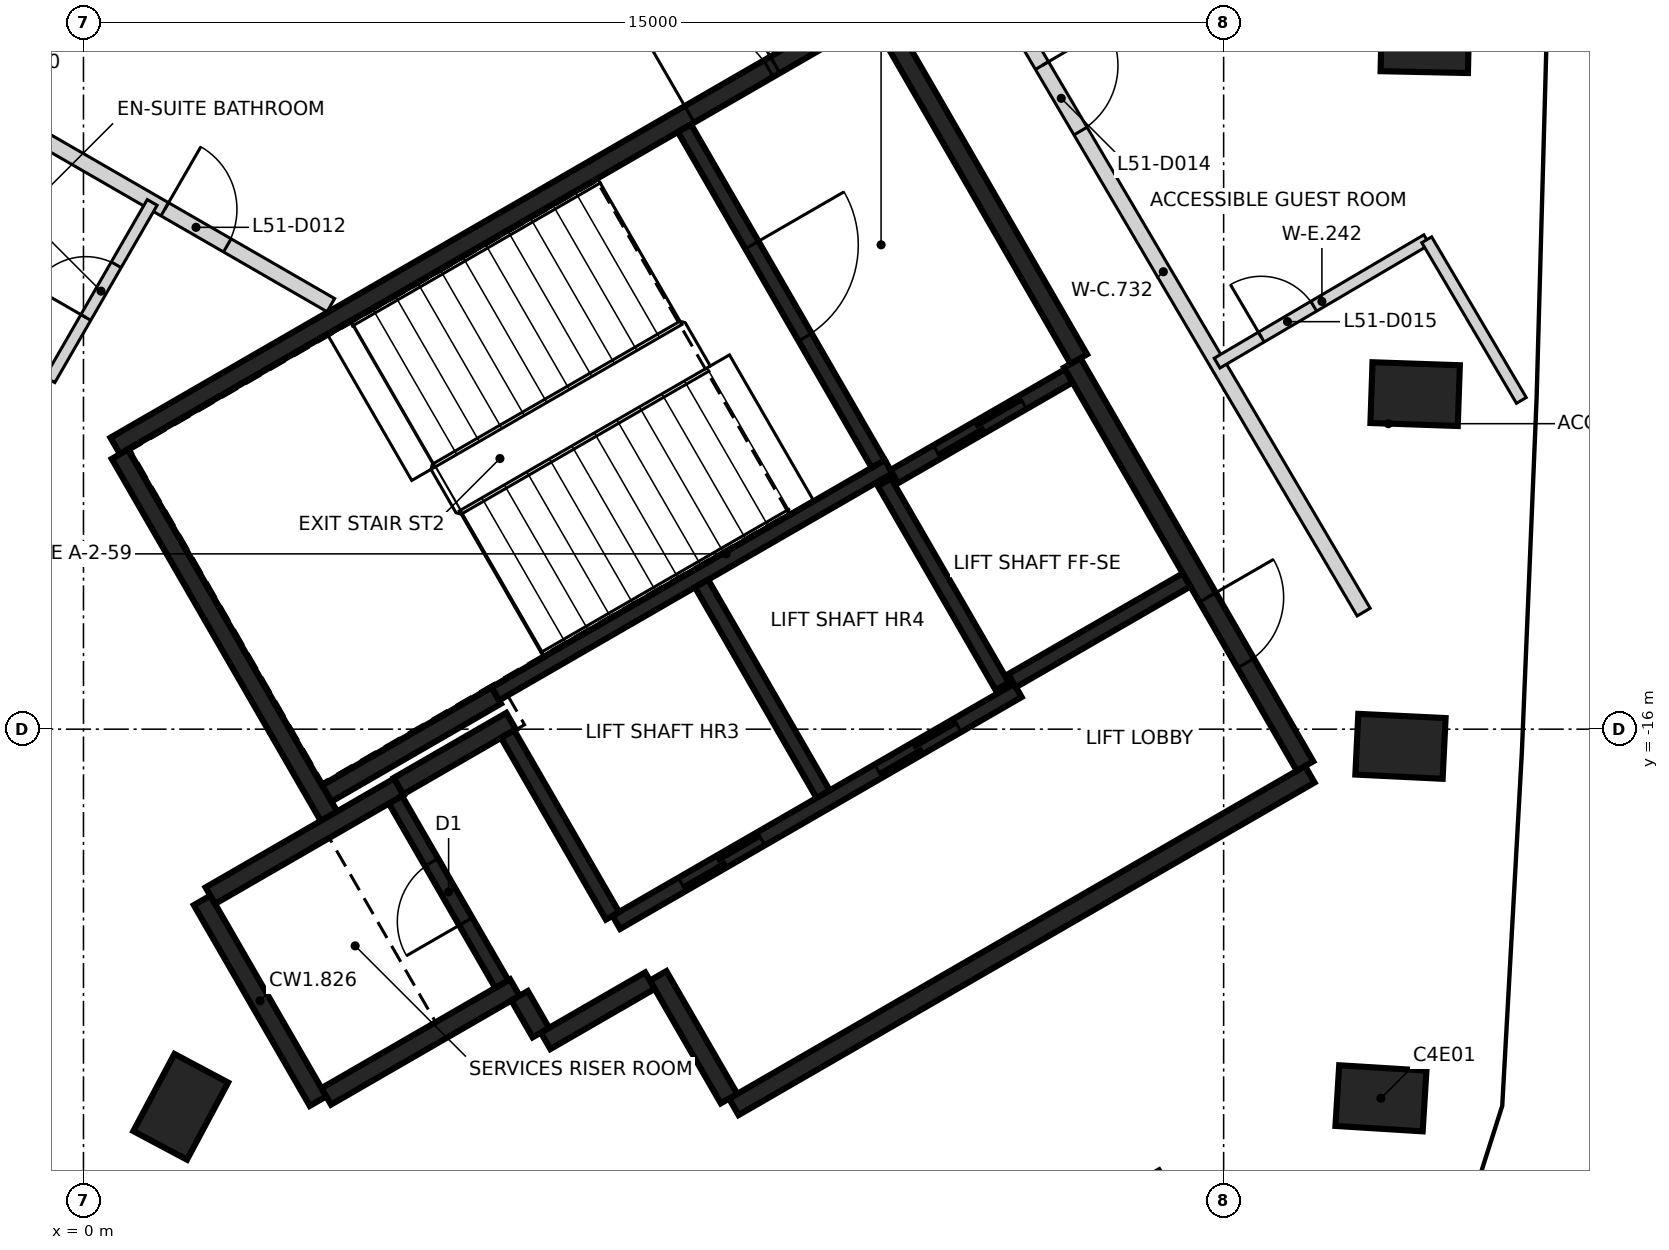
"""IFC4 building model, lengths in metres.
Left out: names, types, materials, properties, quantities, classifications, styles, units other than length and angle.
Written with IfcOpenShell. Run it as: python <this file> out.ifc"""

import sys

from ifc_helpers import new_model, si_unit, direction, frame, frame_2d, origin, origin_2d, place, context, subcontext, project, spatial, rectangle, extrude, element, fill, save


model = new_model("IFC4")
c1 = context("Model", 3, precision=1e-05, world=origin(), true_north=direction((0.0, 1.0)))
c2 = subcontext(c1, "Body", "Model", "MODEL_VIEW")
j1 = project(units=[si_unit("LENGTHUNIT", "METRE"), si_unit("PLANEANGLEUNIT", "RADIAN")], contexts=[c1])
p1 = place(None, origin())
s1 = spatial("IfcSite", under=j1, at=p1, CompositionType="ELEMENT")
p2 = place(p1, origin())
s2 = spatial("IfcBuilding", under=s1, at=p2, CompositionType="ELEMENT")
p3 = place(p2, frame((0.0, 0.0, 204.4)))
s3 = spatial("IfcBuildingStorey", under=s2, at=p3, CompositionType="ELEMENT", Elevation=204.4)
for number, where, z_axis, x_axis in (
    (1, (17.07, -20.856, -0.35), (0.0, 0.0, 1.0), (-0.998, 0.062, 0.0)),
    (2, (17.326, -16.226, -0.35), (0.0, 0.0, 1.0), (-0.999, 0.048, 0.0)),
    (3, (17.519, -11.592, -0.35), (0.0, 0.0, 1.0), (-0.999, 0.034, 0.0)),
    (4, (17.648, -6.956, -0.35), (0.0, 0.0, 1.0), (-1.0, 0.021, 0.0)),
    (5, (1.279, -20.968, -0.35), (0.0, 0.0, 1.0), (0.47, 0.883, 0.0)),
):
    element("IfcColumn", number, at=place(p3, frame(where, z_axis=z_axis, x_axis=x_axis)), inside=s3, PredefinedType="COLUMN", context=c2, shape_type="SweptSolid", body=[
        extrude(rectangle(XDim=1.15, YDim=0.8, at=origin_2d()), origin(), (0.0, 0.0, 1.0), 3.6),
    ])
p4 = place(p3, frame((0.417, -12.273, 0.0), z_axis=(0.0, 0.0, 1.0), x_axis=(0.866021906294, 0.500006057782, 0.0)))
e6 = element("IfcWall", 6, at=p4, inside=s3, PredefinedType="SHEAR", context=c2, shape_type="SweptSolid", body=[
    extrude(rectangle(XDim=11.55, YDim=0.25, at=frame_2d((5.775, 0.0))), origin(), (0.0, 0.0, 1.0), 3.25),
])
p5 = place(p4, frame((10.025, 0.0, 0.0)))
e7 = element("IfcOpeningElement", 7, at=p5, cuts=e6, PredefinedType="OPENING", context=c2, shape_type="SweptSolid", body=[
    extrude(rectangle(XDim=1.2, YDim=2.1, at=frame_2d((0.6, 1.05))), frame((0.0, 0.135, 0.0), z_axis=(0.0, -1.0, 0.0), x_axis=(1.0, 0.0, 0.0)), (0.0, 0.0, 1.0), 0.27),
])
p6 = place(p4, frame((8.725, 0.0, 0.0)))
e8 = element("IfcOpeningElement", 8, at=p6, cuts=e6, PredefinedType="OPENING", context=c2, shape_type="SweptSolid", body=[
    extrude(rectangle(XDim=1.2, YDim=2.1, at=frame_2d((0.6, 1.05))), frame((0.0, 0.135, 0.0), z_axis=(0.0, -1.0, 0.0), x_axis=(1.0, 0.0, 0.0)), (0.0, 0.0, 1.0), 0.27),
])
p7 = place(p3, frame((16.133, -16.594, 0.0), z_axis=(0.0, 0.0, 1.0), x_axis=(-0.866022959057, -0.500004234368, 0.0)))
e9 = element("IfcWall", 9, at=p7, inside=s3, PredefinedType="SHEAR", context=c2, shape_type="SweptSolid", body=[
    extrude(rectangle(XDim=8.75, YDim=0.25, at=frame_2d((4.375, 0.0))), origin(), (0.0, 0.0, 1.0), 3.25),
])
p8 = place(p3, frame((13.008, -11.181, 0.0), z_axis=(0.0, 0.0, 1.0), x_axis=(0.500001955336, -0.866024274868, 0.0)))
e10 = element("IfcWall", 10, at=p8, inside=s3, PredefinedType="SHEAR", context=c2, shape_type="SweptSolid", body=[
    extrude(rectangle(XDim=6.125, YDim=0.25, at=frame_2d((3.062, 0.0))), origin(), (0.0, 0.0, 1.0), 3.25),
])
p9 = place(p8, frame((3.563, 0.0, 0.0)))
e11 = element("IfcOpeningElement", 11, at=p9, cuts=e10, PredefinedType="OPENING", context=c2, shape_type="SweptSolid", body=[
    extrude(rectangle(XDim=1.0, YDim=2.1, at=frame_2d((0.5, 1.05))), frame((0.0, 0.135, 0.0), z_axis=(0.0, -1.0, 0.0), x_axis=(1.0, 0.0, 0.0)), (0.0, 0.0, 1.0), 0.27),
])
p10 = place(p3, frame((3.235, -17.153, 0.0), z_axis=(0.0, 0.0, 1.0), x_axis=(-0.500008851346, 0.866020293397, 0.0)))
e12 = element("IfcWall", 12, at=p10, inside=s3, PredefinedType="SHEAR", context=c2, shape_type="SweptSolid", body=[
    extrude(rectangle(XDim=5.51, YDim=0.25, at=frame_2d((2.755, 0.0))), origin(), (0.0, 0.0, 1.0), 3.25),
])
p11 = place(p3, frame((10.483, -6.606, 0.0), z_axis=(0.0, 0.0, 1.0), x_axis=(0.49999885962, -0.866026062182, 0.0)))
e13 = element("IfcWall", 13, at=p11, inside=s3, PredefinedType="SHEAR", context=c2, shape_type="SweptSolid", body=[
    extrude(rectangle(XDim=5.225, YDim=0.25, at=frame_2d((2.612, 0.0))), origin(), (0.0, 0.0, 1.0), 3.25),
])
p12 = place(p3, frame((3.085, -20.894, 0.0), z_axis=(0.0, 0.0, 1.0), x_axis=(-0.499978833458, 0.866037623948, 0.0)))
e14 = element("IfcWall", 14, at=p12, inside=s3, PredefinedType="SHEAR", context=c2, shape_type="SweptSolid", body=[
    extrude(rectangle(XDim=3.05, YDim=0.25, at=frame_2d((1.525, 0.0))), origin(), (0.0, 0.0, 1.0), 3.25),
])
p13 = place(p3, frame((1.669, -18.19, 0.0), z_axis=(0.0, 0.0, 1.0), x_axis=(0.866042235819, 0.499970844928, 0.0)))
e15 = element("IfcWall", 15, at=p13, inside=s3, PredefinedType="SHEAR", context=c2, shape_type="SweptSolid", body=[
    extrude(rectangle(XDim=2.865, YDim=0.25, at=frame_2d((1.432, 0.0))), origin(), (0.0, 0.0, 1.0), 3.25),
])
p14 = place(p3, frame((5.675, -19.399, 0.0), z_axis=(0.0, 0.0, 1.0), x_axis=(-0.866026637627, -0.499997862916, 0.0)))
e16 = element("IfcWall", 16, at=p14, inside=s3, PredefinedType="SHEAR", context=c2, shape_type="SweptSolid", body=[
    extrude(rectangle(XDim=2.865, YDim=0.25, at=frame_2d((1.432, 0.0))), origin(), (0.0, 0.0, 1.0), 3.25),
])
p15 = place(p3, frame((5.431, -15.556, 0.0), z_axis=(0.0, 0.0, 1.0), x_axis=(-0.866022940537, -0.500004266446, 0.0)))
e17 = element("IfcWall", 17, at=p15, inside=s3, PredefinedType="SHEAR", context=c2, shape_type="SweptSolid", body=[
    extrude(rectangle(XDim=2.575, YDim=0.25, at=frame_2d((1.287, 0.0))), origin(), (0.0, 0.0, 1.0), 3.25),
])
p16 = place(p3, frame((8.493, -20.86, 0.0), z_axis=(0.0, 0.0, 1.0), x_axis=(-0.500039802285, 0.866002422705, 0.0)))
e18 = element("IfcWall", 18, at=p16, inside=s3, PredefinedType="SHEAR", context=c2, shape_type="SweptSolid", body=[
    extrude(rectangle(XDim=1.865, YDim=0.25, at=frame_2d((0.932, 0.0))), origin(), (0.0, 0.0, 1.0), 3.25),
])
p17 = place(p3, frame((4.145, -16.749, 0.0), z_axis=(0.0, 0.0, 1.0), x_axis=(0.866038183914, 0.499977863513, 0.0)))
e19 = element("IfcWall", 19, at=p17, inside=s3, PredefinedType="SHEAR", context=c2, shape_type="SweptSolid", body=[
    extrude(rectangle(XDim=1.71, YDim=0.25, at=frame_2d((0.855, 0.0))), origin(), (0.0, 0.0, 1.0), 3.25),
])
p18 = place(p3, frame((7.452, -19.308, 0.0), z_axis=(0.0, 0.0, 1.0), x_axis=(-0.866044474677, -0.49996696679, 0.0)))
e20 = element("IfcWall", 20, at=p18, inside=s3, PredefinedType="SHEAR", context=c2, shape_type="SweptSolid", body=[
    extrude(rectangle(XDim=1.584, YDim=0.25, at=frame_2d((0.792, 0.0))), origin(), (0.0, 0.0, 1.0), 3.25),
])
p19 = place(p3, frame((6.017, -19.992, 0.0), z_axis=(0.0, 0.0, 1.0), x_axis=(-0.500364886717, 0.865814633822, 0.0)))
e21 = element("IfcWall", 21, at=p19, inside=s3, PredefinedType="SHEAR", context=c2, shape_type="SweptSolid", body=[
    extrude(rectangle(XDim=0.559, YDim=0.25, at=frame_2d((0.28, 0.0))), origin(), (0.0, 0.0, 1.0), 3.25),
])
p20 = place(p3, frame((5.419, -15.534, 0.0), z_axis=(0.0, 0.0, 1.0), x_axis=(0.866029065029, 0.499993658486, 0.0)))
e22 = element("IfcWall", 22, at=p20, inside=s3, PredefinedType="SHEAR", context=c2, shape_type="SweptSolid", body=[
    extrude(rectangle(XDim=5.974, YDim=0.2, at=frame_2d((2.987, 0.0))), origin(), (0.0, 0.0, 1.0), 3.25),
])
p21 = place(p3, frame((7.01, -18.542, 0.0), z_axis=(0.0, 0.0, 1.0), x_axis=(0.866030299012, 0.499991521122, 0.0)))
e23 = element("IfcWall", 23, at=p21, inside=s3, PredefinedType="SHEAR", context=c2, shape_type="SweptSolid", body=[
    extrude(rectangle(XDim=6.1, YDim=0.2, at=frame_2d((3.05, 0.0))), origin(), (0.0, 0.0, 1.0), 3.25),
])
p22 = place(p21, frame((1.0, 0.0, 0.0)))
e24 = element("IfcOpeningElement", 24, at=p22, cuts=e23, PredefinedType="OPENING", context=c2, shape_type="SweptSolid", body=[
    extrude(rectangle(XDim=1.2, YDim=2.1, at=frame_2d((0.6, 1.05))), frame((0.0, 0.11, 0.0), z_axis=(0.0, -1.0, 0.0), x_axis=(1.0, 0.0, 0.0)), (0.0, 0.0, 1.0), 0.22),
])
p23 = place(p21, frame((3.982, 0.0, 0.0)))
e25 = element("IfcOpeningElement", 25, at=p23, cuts=e23, PredefinedType="OPENING", context=c2, shape_type="SweptSolid", body=[
    extrude(rectangle(XDim=1.2, YDim=2.1, at=frame_2d((0.6, 1.05))), frame((0.0, 0.11, 0.0), z_axis=(0.0, -1.0, 0.0), x_axis=(1.0, 0.0, 0.0)), (0.0, 0.0, 1.0), 0.22),
])
p24 = place(p3, frame((7.906, -8.094, 0.0), z_axis=(0.0, 0.0, 1.0), x_axis=(0.500027839223, -0.866009330205, 0.0)))
e26 = element("IfcWall", 26, at=p24, inside=s3, PredefinedType="SHEAR", context=c2, shape_type="SweptSolid", body=[
    extrude(rectangle(XDim=5.098, YDim=0.2, at=frame_2d((2.549, 0.0))), origin(), (0.0, 0.0, 1.0), 3.25),
])
p25 = place(p24, frame((1.774, 0.0, 0.0)))
e27 = element("IfcOpeningElement", 27, at=p25, cuts=e26, PredefinedType="OPENING", context=c2, shape_type="SweptSolid", body=[
    extrude(rectangle(XDim=1.4, YDim=2.1, at=frame_2d((0.7, 1.05))), frame((0.0, 0.11, 0.0), z_axis=(0.0, -1.0, 0.0), x_axis=(1.0, 0.0, 0.0)), (0.0, 0.0, 1.0), 0.22),
])
p26 = place(p3, frame((8.132, -14.084, 0.0), z_axis=(0.0, 0.0, 1.0), x_axis=(0.499997778408, -0.866026686418, 0.0)))
e28 = element("IfcWall", 28, at=p26, inside=s3, PredefinedType="SHEAR", context=c2, shape_type="SweptSolid", body=[
    extrude(rectangle(XDim=3.198, YDim=0.2, at=frame_2d((1.599, 0.0))), origin(), (0.0, 0.0, 1.0), 3.25),
])
p27 = place(p3, frame((5.503, -19.352, 0.0), z_axis=(0.0, 0.0, 1.0), x_axis=(-0.499986818241, 0.866033014143, 0.0)))
e29 = element("IfcWall", 29, at=p27, inside=s3, PredefinedType="SHEAR", context=c2, shape_type="SweptSolid", body=[
    extrude(rectangle(XDim=2.798, YDim=0.2, at=frame_2d((1.399, 0.0))), origin(), (0.0, 0.0, 1.0), 3.25),
])
p28 = place(p27, frame((0.949, 0.0, 0.0)))
e30 = element("IfcOpeningElement", 30, at=p28, cuts=e29, PredefinedType="OPENING", context=c2, shape_type="SweptSolid", body=[
    extrude(rectangle(XDim=0.9, YDim=2.1, at=frame_2d((0.45, 1.05))), frame((0.0, 0.11, 0.0), z_axis=(0.0, -1.0, 0.0), x_axis=(1.0, 0.0, 0.0)), (0.0, 0.0, 1.0), 0.22),
])
p29 = place(p3, frame((6.96, -18.455, 0.0), z_axis=(0.0, 0.0, 1.0), x_axis=(-0.499926705758, 0.866067716099, 0.0)))
e31 = element("IfcWall", 31, at=p29, inside=s3, PredefinedType="SHEAR", context=c2, shape_type="SweptSolid", body=[
    extrude(rectangle(XDim=2.759, YDim=0.2, at=frame_2d((1.38, 0.0))), origin(), (0.0, 0.0, 1.0), 3.25),
])
p30 = place(p3, frame((12.088, -15.437, 0.0), z_axis=(0.0, 0.0, 1.0), x_axis=(-0.500026960575, 0.86600983753, 0.0)))
e32 = element("IfcWall", 32, at=p30, inside=s3, PredefinedType="SHEAR", context=c2, shape_type="SweptSolid", body=[
    extrude(rectangle(XDim=3.1, YDim=0.2, at=frame_2d((1.55, 0.0))), origin(), (0.0, 0.0, 1.0), 3.25),
])
p31 = place(p3, frame((10.666, -12.678, 0.0), z_axis=(0.0, 0.0, 1.0), x_axis=(0.866018407898, 0.500012117035, 0.0)))
e33 = element("IfcWall", 33, at=p31, inside=s3, PredefinedType="SHEAR", context=c2, shape_type="SweptSolid", body=[
    extrude(rectangle(XDim=2.651, YDim=0.2, at=frame_2d((1.325, 0.0))), origin(), (0.0, 0.0, 1.0), 3.25),
])
p32 = place(p31, frame((0.652, 0.0, 0.0)))
e34 = element("IfcOpeningElement", 34, at=p32, cuts=e33, PredefinedType="OPENING", context=c2, shape_type="SweptSolid", body=[
    extrude(rectangle(XDim=1.3, YDim=2.1, at=frame_2d((0.65, 1.05))), frame((0.0, 0.11, 0.0), z_axis=(0.0, -1.0, 0.0), x_axis=(1.0, 0.0, 0.0)), (0.0, 0.0, 1.0), 0.22),
])
p33 = place(p3, frame((14.512, -14.037, 0.0), z_axis=(0.0, 0.0, 1.0), x_axis=(-0.866018407898, -0.500012117035, 0.0)))
e35 = element("IfcWall", 35, at=p33, inside=s3, PredefinedType="SHEAR", context=c2, shape_type="SweptSolid", body=[
    extrude(rectangle(XDim=2.651, YDim=0.2, at=frame_2d((1.325, 0.0))), origin(), (0.0, 0.0, 1.0), 3.25),
])
p34 = place(p3, frame((-8.001, -3.926, 0.0), z_axis=(0.0, 0.0, 1.0), x_axis=(0.866131158271, -0.499816783104, 0.0)))
e36 = element("IfcWall", 36, at=p34, inside=s3, PredefinedType="PARTITIONING", context=c2, shape_type="SweptSolid", body=[
    extrude(rectangle(XDim=12.995, YDim=0.2, at=frame_2d((6.498, 0.0))), origin(), (0.0, 0.0, 1.0), 3.25),
])
p35 = place(p34, frame((6.146, 0.0, 0.0)))
e37 = element("IfcOpeningElement", 37, at=p35, cuts=e36, PredefinedType="OPENING", context=c2, shape_type="SweptSolid", body=[
    extrude(rectangle(XDim=0.95, YDim=2.1, at=frame_2d((0.475, 1.05))), frame((0.0, 0.11, 0.0), z_axis=(0.0, -1.0, 0.0), x_axis=(1.0, 0.0, 0.0)), (0.0, 0.0, 1.0), 0.22),
])
p36 = place(p34, frame((10.472, 0.0, 0.0)))
e38 = element("IfcOpeningElement", 38, at=p36, cuts=e36, PredefinedType="OPENING", context=c2, shape_type="SweptSolid", body=[
    extrude(rectangle(XDim=0.95, YDim=2.1, at=frame_2d((0.475, 1.05))), frame((0.0, 0.11, 0.0), z_axis=(0.0, -1.0, 0.0), x_axis=(1.0, 0.0, 0.0)), (0.0, 0.0, 1.0), 0.22),
])
p37 = place(p3, frame((11.571, -5.505, 0.0), z_axis=(0.0, 0.0, 1.0), x_axis=(0.507266536157, -0.861789220921, 0.0)))
e39 = element("IfcWall", 39, at=p37, inside=s3, PredefinedType="PARTITIONING", context=c2, shape_type="SweptSolid", body=[
    extrude(rectangle(XDim=10.391, YDim=0.2, at=frame_2d((5.195, 0.0))), origin(), (0.0, 0.0, 1.0), 3.25),
])
p38 = place(p37, frame((2.048, 0.0, 0.0)))
e40 = element("IfcOpeningElement", 40, at=p38, cuts=e39, PredefinedType="OPENING", context=c2, shape_type="SweptSolid", body=[
    extrude(rectangle(XDim=1.0, YDim=2.1, at=frame_2d((0.5, 1.05))), frame((0.0, 0.11, 0.0), z_axis=(0.0, -1.0, 0.0), x_axis=(1.0, 0.0, 0.0)), (0.0, 0.0, 1.0), 0.22),
])
p39 = place(p3, frame((-3.042, -9.906, 0.0), z_axis=(0.0, 0.0, 1.0), x_axis=(0.866009279501, -0.500027927039, 0.0)))
e41 = element("IfcWall", 41, at=p39, inside=s3, PredefinedType="PARTITIONING", context=c2, shape_type="SweptSolid", body=[
    extrude(rectangle(XDim=2.998, YDim=0.15, at=frame_2d((1.499, 0.0))), origin(), (0.0, 0.0, 1.0), 3.25),
])
p40 = place(p3, frame((-0.442, -11.403, 0.0), z_axis=(0.0, 0.0, 1.0), x_axis=(0.499717222117, 0.866188604127, 0.0)))
e42 = element("IfcWall", 42, at=p40, inside=s3, PredefinedType="PARTITIONING", context=c2, shape_type="SweptSolid", body=[
    extrude(rectangle(XDim=2.693, YDim=0.15, at=frame_2d((1.347, 0.0))), origin(), (0.0, 0.0, 1.0), 3.25),
])
p41 = place(p40, frame((0.946, 0.0, 0.0)))
e43 = element("IfcOpeningElement", 43, at=p41, cuts=e42, PredefinedType="OPENING", context=c2, shape_type="SweptSolid", body=[
    extrude(rectangle(XDim=0.8, YDim=2.1, at=frame_2d((0.4, 1.05))), frame((0.0, 0.085, 0.0), z_axis=(0.0, -1.0, 0.0), x_axis=(1.0, 0.0, 0.0)), (0.0, 0.0, 1.0), 0.17),
])
p42 = place(p3, frame((14.914, -11.184, 0.0), z_axis=(0.0, 0.0, 1.0), x_axis=(0.861843987552, 0.507173482273, 0.0)))
e44 = element("IfcWall", 44, at=p42, inside=s3, PredefinedType="PARTITIONING", context=c2, shape_type="SweptSolid", body=[
    extrude(rectangle(XDim=3.2, YDim=0.15, at=frame_2d((1.6, 0.0))), origin(), (0.0, 0.0, 1.0), 2.35),
])
p43 = place(p42, frame((0.675, 0.0, 0.0)))
e45 = element("IfcOpeningElement", 45, at=p43, cuts=e44, PredefinedType="OPENING", context=c2, shape_type="SweptSolid", body=[
    extrude(rectangle(XDim=0.8, YDim=2.1, at=frame_2d((0.4, 1.05))), frame((0.0, 0.085, 0.0), z_axis=(0.0, -1.0, 0.0), x_axis=(1.0, 0.0, 0.0)), (0.0, 0.0, 1.0), 0.17),
])
p44 = place(p3, frame((17.672, -9.561, 0.0), z_axis=(0.0, 0.0, 1.0), x_axis=(0.507424524348, -0.86169620638, 0.0)))
e46 = element("IfcWall", 46, at=p44, inside=s3, PredefinedType="PARTITIONING", context=c2, shape_type="SweptSolid", body=[
    extrude(rectangle(XDim=2.453, YDim=0.15, at=frame_2d((1.227, 0.0))), origin(), (0.0, 0.0, 1.0), 2.35),
])
p45 = place(p32, origin())
e47 = element("IfcDoor", 47, at=p45, inside=s3, OperationType="SLIDING_TO_RIGHT", PredefinedType="DOOR", context=c2, shape_type="SweptSolid", body=[
    extrude(rectangle(XDim=1.3, YDim=2.1, at=frame_2d((0.65, 1.05))), frame((0.0, 0.025, 0.0), z_axis=(0.0, -1.0, 0.0), x_axis=(1.0, 0.0, 0.0)), (0.0, 0.0, 1.0), 0.05),
])
fill(e34, e47)
p46 = place(p22, origin())
e48 = element("IfcDoor", 48, at=p46, inside=s3, OperationType="DOUBLE_DOOR_SLIDING", PredefinedType="DOOR", context=c2, shape_type="SweptSolid", body=[
    extrude(rectangle(XDim=1.2, YDim=2.1, at=frame_2d((0.6, 1.05))), frame((0.0, 0.025, 0.0), z_axis=(0.0, -1.0, 0.0), x_axis=(1.0, 0.0, 0.0)), (0.0, 0.0, 1.0), 0.05),
])
fill(e24, e48)
p47 = place(p23, origin())
e49 = element("IfcDoor", 49, at=p47, inside=s3, OperationType="DOUBLE_DOOR_SLIDING", PredefinedType="DOOR", context=c2, shape_type="SweptSolid", body=[
    extrude(rectangle(XDim=1.2, YDim=2.1, at=frame_2d((0.6, 1.05))), frame((0.0, 0.025, 0.0), z_axis=(0.0, -1.0, 0.0), x_axis=(1.0, 0.0, 0.0)), (0.0, 0.0, 1.0), 0.05),
])
fill(e25, e49)
p48 = place(p9, origin())
e50 = element("IfcDoor", 50, at=p48, inside=s3, OperationType="SINGLE_SWING_LEFT", PredefinedType="DOOR", context=c2, shape_type="SweptSolid", body=[
    extrude(rectangle(XDim=1.0, YDim=2.1, at=frame_2d((0.5, 1.05))), frame((0.0, 0.025, 0.0), z_axis=(0.0, -1.0, 0.0), x_axis=(1.0, 0.0, 0.0)), (0.0, 0.0, 1.0), 0.05),
])
fill(e11, e50)
p49 = place(p5, origin())
e51 = element("IfcDoor", 51, at=p49, inside=s3, OperationType="SINGLE_SWING_LEFT", PredefinedType="DOOR", context=c2, shape_type="SweptSolid", body=[
    extrude(rectangle(XDim=1.2, YDim=2.1, at=frame_2d((0.6, 1.05))), frame((0.0, 0.025, 0.0), z_axis=(0.0, -1.0, 0.0), x_axis=(1.0, 0.0, 0.0)), (0.0, 0.0, 1.0), 0.05),
])
fill(e7, e51)
p50 = place(p6, origin())
e52 = element("IfcDoor", 52, at=p50, inside=s3, OperationType="SINGLE_SWING_RIGHT", PredefinedType="DOOR", context=c2, shape_type="SweptSolid", body=[
    extrude(rectangle(XDim=1.2, YDim=2.1, at=frame_2d((0.6, 1.05))), frame((0.0, 0.025, 0.0), z_axis=(0.0, -1.0, 0.0), x_axis=(1.0, 0.0, 0.0)), (0.0, 0.0, 1.0), 0.05),
])
fill(e8, e52)
p51 = place(p25, origin())
e53 = element("IfcDoor", 53, at=p51, inside=s3, OperationType="SINGLE_SWING_RIGHT", PredefinedType="DOOR", context=c2, shape_type="SweptSolid", body=[
    extrude(rectangle(XDim=1.4, YDim=2.1, at=frame_2d((0.7, 1.05))), frame((0.0, 0.025, 0.0), z_axis=(0.0, -1.0, 0.0), x_axis=(1.0, 0.0, 0.0)), (0.0, 0.0, 1.0), 0.05),
])
fill(e27, e53)
p52 = place(p28, origin())
e54 = element("IfcDoor", 54, at=p52, inside=s3, OperationType="SINGLE_SWING_LEFT", PredefinedType="DOOR", context=c2, shape_type="SweptSolid", body=[
    extrude(rectangle(XDim=0.9, YDim=2.1, at=frame_2d((0.45, 1.05))), frame((0.0, 0.025, 0.0), z_axis=(0.0, -1.0, 0.0), x_axis=(1.0, 0.0, 0.0)), (0.0, 0.0, 1.0), 0.05),
])
fill(e30, e54)
p53 = place(p36, frame((0.95, 0.0, 0.0), z_axis=(0.0, 0.0, 1.0), x_axis=(-1.0, 0.0, 0.0)))
e55 = element("IfcDoor", 55, at=p53, inside=s3, OperationType="SINGLE_SWING_LEFT", PredefinedType="DOOR", context=c2, shape_type="SweptSolid", body=[
    extrude(rectangle(XDim=0.95, YDim=2.1, at=frame_2d((0.475, 1.05))), frame((0.0, 0.025, 0.0), z_axis=(0.0, -1.0, 0.0), x_axis=(1.0, 0.0, 0.0)), (0.0, 0.0, 1.0), 0.05),
])
fill(e38, e55)
p54 = place(p41, frame((0.8, 0.0, 0.0), z_axis=(0.0, 0.0, 1.0), x_axis=(-1.0, 0.0, 0.0)))
e56 = element("IfcDoor", 56, at=p54, inside=s3, OperationType="SINGLE_SWING_LEFT", PredefinedType="DOOR", context=c2, shape_type="SweptSolid", body=[
    extrude(rectangle(XDim=0.8, YDim=2.1, at=frame_2d((0.4, 1.05))), frame((0.0, 0.025, 0.0), z_axis=(0.0, -1.0, 0.0), x_axis=(1.0, 0.0, 0.0)), (0.0, 0.0, 1.0), 0.05),
])
fill(e43, e56)
p55 = place(p38, origin())
e57 = element("IfcDoor", 57, at=p55, inside=s3, OperationType="SINGLE_SWING_LEFT", PredefinedType="DOOR", context=c2, shape_type="SweptSolid", body=[
    extrude(rectangle(XDim=1.0, YDim=2.1, at=frame_2d((0.5, 1.05))), frame((0.0, 0.025, 0.0), z_axis=(0.0, -1.0, 0.0), x_axis=(1.0, 0.0, 0.0)), (0.0, 0.0, 1.0), 0.05),
])
fill(e40, e57)
p56 = place(p43, origin())
e58 = element("IfcDoor", 58, at=p56, inside=s3, OperationType="SINGLE_SWING_LEFT", PredefinedType="DOOR", context=c2, shape_type="SweptSolid", body=[
    extrude(rectangle(XDim=0.8, YDim=2.1, at=frame_2d((0.4, 1.05))), frame((0.0, 0.025, 0.0), z_axis=(0.0, -1.0, 0.0), x_axis=(1.0, 0.0, 0.0)), (0.0, 0.0, 1.0), 0.05),
])
fill(e45, e58)
save(model, sys.argv[1])
